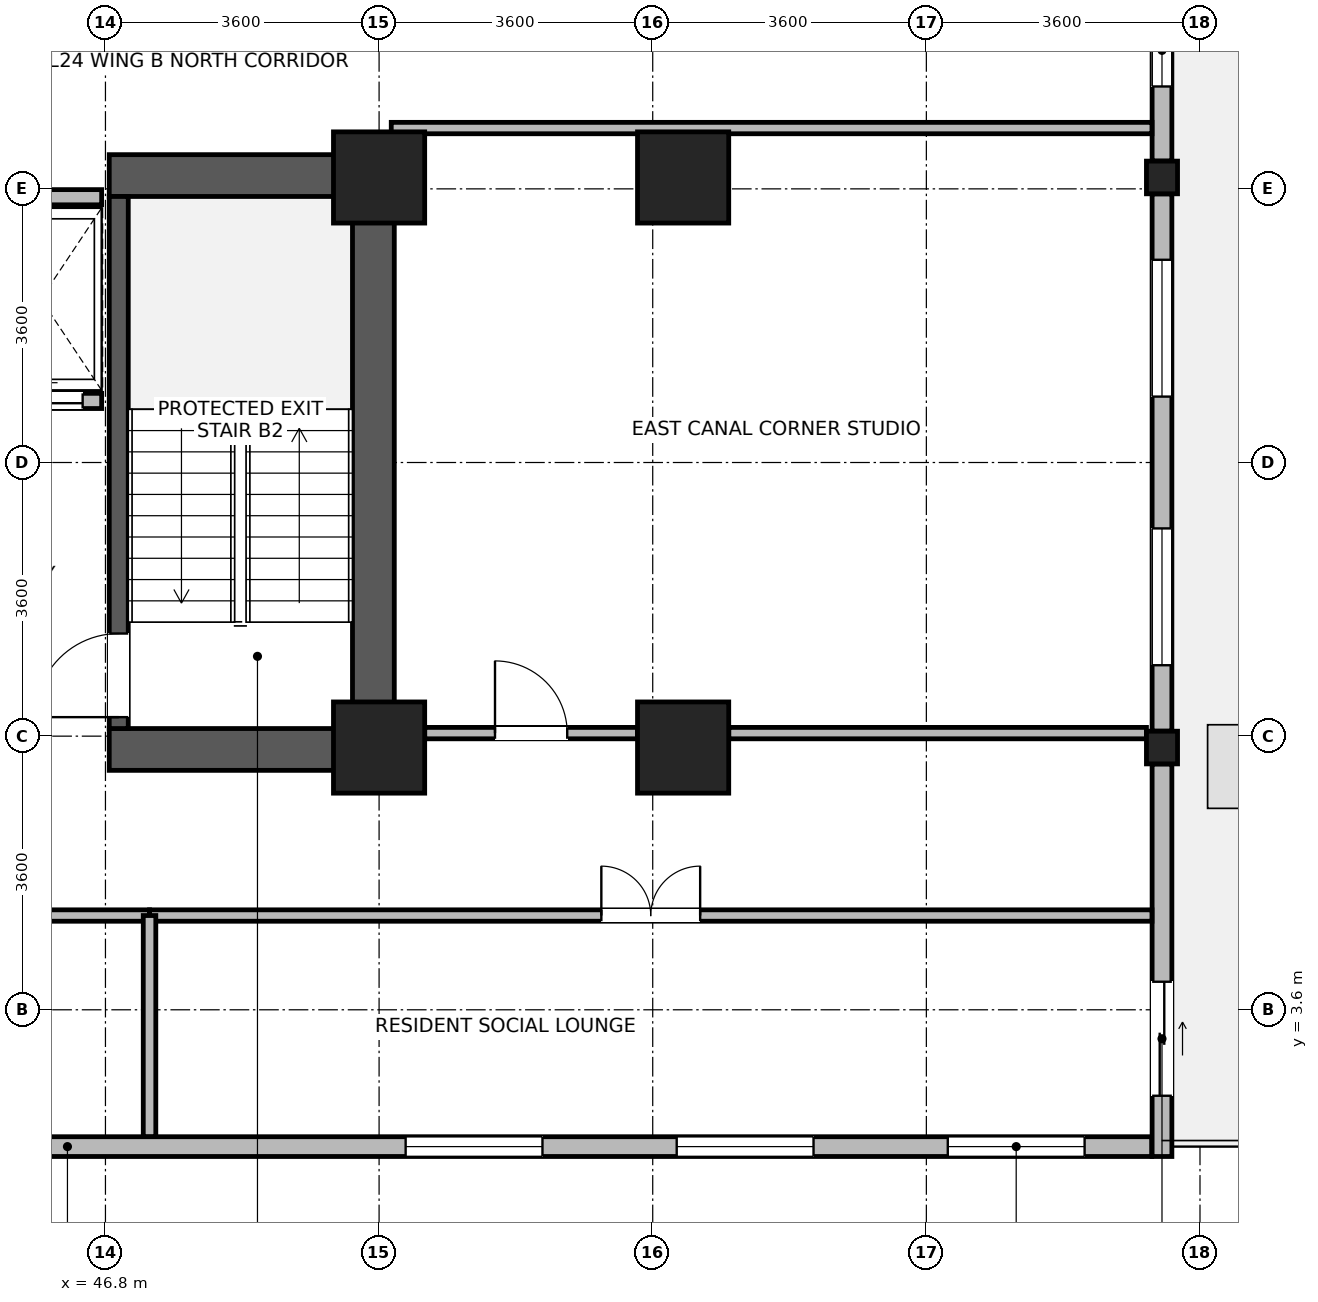
"""IFC4 building model, lengths in metres.
Left out: names, types, materials, properties, quantities, classifications, styles, units other than length and angle.
Written with IfcOpenShell. Run it as: python <this file> out.ifc"""

import sys

from ifc_helpers import new_model, si_unit, direction, frame, frame_2d, origin, origin_2d, place, context, subcontext, project, spatial, rectangle, i_section, extrude, source, transform, mapped, element, fill, save


model = new_model("IFC4")
c1 = context("Model", 3, precision=1e-05, world=origin(), true_north=direction((0.0, 1.0)))
c2 = subcontext(c1, "Body", "Model", "MODEL_VIEW")
j1 = project(units=[si_unit("LENGTHUNIT", "METRE"), si_unit("PLANEANGLEUNIT", "RADIAN")], contexts=[c1])
p1 = place(None, origin())
s1 = spatial("IfcSite", under=j1, at=p1, CompositionType="ELEMENT")
p2 = place(p1, origin())
s2 = spatial("IfcBuilding", under=s1, at=p2, CompositionType="ELEMENT")
p3 = place(p2, frame((0.0, 0.0, 97.1)))
s3 = spatial("IfcBuildingStorey", under=s2, at=p3, CompositionType="ELEMENT", Elevation=97.1)
p4 = place(p3, frame((50.325, 6.75, 0.0), z_axis=(0.0, 0.0, 1.0), x_axis=(0.0, 1.0, 0.0)))
e1 = element("IfcWall", 1, at=p4, inside=s3, PredefinedType="SHEAR", context=c2, shape_type="SweptSolid", body=[
    extrude(rectangle(XDim=8.1, YDim=0.55, at=frame_2d((4.05, 0.0))), origin(), (0.0, 0.0, 1.0), 3.45),
])
for number, where, z_axis, x_axis in (
    (2, (46.85, 7.025, 0.0), (0.0, 0.0, 1.0), (1.0, 0.0, 0.0)),
    (3, (46.85, 14.575, 0.0), (0.0, 0.0, 1.0), (1.0, 0.0, 0.0)),
):
    element("IfcWall", number, at=place(p3, frame(where, z_axis=z_axis, x_axis=x_axis)), inside=s3, PredefinedType="SHEAR", context=c2, shape_type="SweptSolid", body=[
        extrude(rectangle(XDim=3.2, YDim=0.55, at=frame_2d((1.6, 0.0))), origin(), (0.0, 0.0, 1.0), 3.45),
    ])
p5 = place(p3, frame((46.975, 7.3, 0.0), z_axis=(0.0, 0.0, 1.0), x_axis=(0.0, 1.0, 0.0)))
e4 = element("IfcWall", 4, at=p5, inside=s3, PredefinedType="SHEAR", context=c2, shape_type="SweptSolid", body=[
    extrude(rectangle(XDim=7.0, YDim=0.25, at=frame_2d((3.5, 0.0))), origin(), (0.0, 0.0, 1.0), 3.45),
])
p6 = place(p5, frame((0.15, 0.0, 0.0)))
e5 = element("IfcOpeningElement", 5, at=p6, cuts=e4, PredefinedType="OPENING", context=c2, shape_type="SweptSolid", body=[
    extrude(rectangle(XDim=1.1, YDim=2.08, at=frame_2d((0.55, 1.04))), frame((0.0, 0.135, 0.0), z_axis=(0.0, -1.0, 0.0), x_axis=(1.0, 0.0, 0.0)), (0.0, 0.0, 1.0), 0.27),
])
m1 = source(origin(), c2, "Body", "SweptSolid", [
    extrude(rectangle(XDim=1.2, YDim=1.2, at=origin_2d()), origin(), (0.0, 0.0, 1.0), 3.7),
])
for number, where, z_axis, x_axis in (
    (6, (50.4, 7.05, 0.0), (0.0, 0.0, 1.0), (1.0, 0.0, 0.0)),
    (7, (50.4, 14.55, 0.0), (0.0, 0.0, 1.0), (1.0, 0.0, 0.0)),
    (8, (54.4, 7.05, 0.0), (0.0, 0.0, 1.0), (1.0, 0.0, 0.0)),
    (9, (54.4, 14.55, 0.0), (0.0, 0.0, 1.0), (1.0, 0.0, 0.0)),
):
    element("IfcColumn", number, at=place(p3, frame(where, z_axis=z_axis, x_axis=x_axis)), inside=s3, PredefinedType="COLUMN", context=c2, shape_type="MappedRepresentation", body=[
        mapped(m1, transform((0.0, 0.0, 0.0), x_axis=(1.0, 0.0, 0.0), y_axis=(0.0, 1.0, 0.0), z_axis=(0.0, 0.0, 1.0), scale=1.0)),
    ])
m2 = source(origin(), c2, "Body", "SweptSolid", [
    extrude(i_section(OverallWidth=0.409, OverallDepth=0.43, WebThickness=0.024, FlangeThickness=0.033, FilletRadius=0.015, at=origin_2d()), origin(), (0.0, 0.0, 1.0), 3.7),
])
for number, where, z_axis, x_axis in (
    (10, (60.7, 7.05, 0.0), (0.0, 0.0, 1.0), (1.0, 0.0, 0.0)),
    (11, (60.7, 14.55, 0.0), (0.0, 0.0, 1.0), (1.0, 0.0, 0.0)),
):
    element("IfcColumn", number, at=place(p3, frame(where, z_axis=z_axis, x_axis=x_axis)), inside=s3, PredefinedType="COLUMN", context=c2, shape_type="MappedRepresentation", body=[
        mapped(m2, transform((0.0, 0.0, 0.0), x_axis=(1.0, 0.0, 0.0), y_axis=(0.0, 1.0, 0.0), z_axis=(0.0, 0.0, 1.0), scale=1.0)),
    ])
p7 = place(p3, frame((60.565, 1.8, 0.0), z_axis=(0.0, 0.0, 1.0), x_axis=(-1.0, 0.0, 0.0)))
e12 = element("IfcWall", 12, at=p7, inside=s3, PredefinedType="STANDARD", context=c2, shape_type="SweptSolid", body=[
    extrude(rectangle(XDim=28.53, YDim=0.26, at=frame_2d((14.265, 0.0))), origin(), (0.0, 0.0, 1.0), 3.43),
])
p8 = place(p7, frame((0.883, 0.0, 0.85)))
e13 = element("IfcOpeningElement", 13, at=p8, cuts=e12, PredefinedType="OPENING", context=c2, shape_type="SweptSolid", body=[
    extrude(rectangle(XDim=1.8, YDim=1.85, at=frame_2d((0.9, 0.925))), frame((0.0, 0.14, 0.0), z_axis=(0.0, -1.0, 0.0), x_axis=(1.0, 0.0, 0.0)), (0.0, 0.0, 1.0), 0.28),
])
p9 = place(p7, frame((4.449, 0.0, 0.85)))
e14 = element("IfcOpeningElement", 14, at=p9, cuts=e12, PredefinedType="OPENING", context=c2, shape_type="SweptSolid", body=[
    extrude(rectangle(XDim=1.8, YDim=1.85, at=frame_2d((0.9, 0.925))), frame((0.0, 0.14, 0.0), z_axis=(0.0, -1.0, 0.0), x_axis=(1.0, 0.0, 0.0)), (0.0, 0.0, 1.0), 0.28),
])
p10 = place(p7, frame((8.016, 0.0, 0.85)))
e15 = element("IfcOpeningElement", 15, at=p10, cuts=e12, PredefinedType="OPENING", context=c2, shape_type="SweptSolid", body=[
    extrude(rectangle(XDim=1.8, YDim=1.85, at=frame_2d((0.9, 0.925))), frame((0.0, 0.14, 0.0), z_axis=(0.0, -1.0, 0.0), x_axis=(1.0, 0.0, 0.0)), (0.0, 0.0, 1.0), 0.28),
])
p11 = place(p7, frame((15.148, 0.0, 0.85)))
e16 = element("IfcOpeningElement", 16, at=p11, cuts=e12, PredefinedType="OPENING", context=c2, shape_type="SweptSolid", body=[
    extrude(rectangle(XDim=1.8, YDim=1.85, at=frame_2d((0.9, 0.925))), frame((0.0, 0.14, 0.0), z_axis=(0.0, -1.0, 0.0), x_axis=(1.0, 0.0, 0.0)), (0.0, 0.0, 1.0), 0.28),
])
p12 = place(p7, frame((18.714, 0.0, 0.85)))
e17 = element("IfcOpeningElement", 17, at=p12, cuts=e12, PredefinedType="OPENING", context=c2, shape_type="SweptSolid", body=[
    extrude(rectangle(XDim=1.8, YDim=1.85, at=frame_2d((0.9, 0.925))), frame((0.0, 0.14, 0.0), z_axis=(0.0, -1.0, 0.0), x_axis=(1.0, 0.0, 0.0)), (0.0, 0.0, 1.0), 0.28),
])
p13 = place(p7, frame((22.281, 0.0, 0.85)))
e18 = element("IfcOpeningElement", 18, at=p13, cuts=e12, PredefinedType="OPENING", context=c2, shape_type="SweptSolid", body=[
    extrude(rectangle(XDim=1.8, YDim=1.85, at=frame_2d((0.9, 0.925))), frame((0.0, 0.14, 0.0), z_axis=(0.0, -1.0, 0.0), x_axis=(1.0, 0.0, 0.0)), (0.0, 0.0, 1.0), 0.28),
])
p14 = place(p7, frame((25.847, 0.0, 0.85)))
e19 = element("IfcOpeningElement", 19, at=p14, cuts=e12, PredefinedType="OPENING", context=c2, shape_type="SweptSolid", body=[
    extrude(rectangle(XDim=1.8, YDim=1.85, at=frame_2d((0.9, 0.925))), frame((0.0, 0.14, 0.0), z_axis=(0.0, -1.0, 0.0), x_axis=(1.0, 0.0, 0.0)), (0.0, 0.0, 1.0), 0.28),
])
p15 = place(p3, frame((60.7, 6.834, 0.0), z_axis=(0.0, 0.0, 1.0), x_axis=(0.0, -1.0, 0.0)))
e20 = element("IfcWall", 20, at=p15, inside=s3, PredefinedType="STANDARD", context=c2, shape_type="SweptSolid", body=[
    extrude(rectangle(XDim=5.164, YDim=0.26, at=frame_2d((2.582, 0.0))), origin(), (0.0, 0.0, 1.0), 3.43),
])
p16 = place(p15, frame((2.865, 0.0, 0.0)))
e21 = element("IfcOpeningElement", 21, at=p16, cuts=e20, PredefinedType="OPENING", context=c2, shape_type="SweptSolid", body=[
    extrude(rectangle(XDim=1.5, YDim=2.15, at=frame_2d((0.75, 1.075))), frame((0.0, 0.14, 0.0), z_axis=(0.0, -1.0, 0.0), x_axis=(1.0, 0.0, 0.0)), (0.0, 0.0, 1.0), 0.28),
])
p17 = place(p3, frame((60.7, 14.334, 0.0), z_axis=(0.0, 0.0, 1.0), x_axis=(0.0, -1.0, 0.0)))
e22 = element("IfcWall", 22, at=p17, inside=s3, PredefinedType="STANDARD", context=c2, shape_type="SweptSolid", body=[
    extrude(rectangle(XDim=7.068, YDim=0.26, at=frame_2d((3.534, 0.0))), origin(), (0.0, 0.0, 1.0), 2.98),
])
p18 = place(p17, frame((0.867, 0.0, 0.85)))
e23 = element("IfcOpeningElement", 23, at=p18, cuts=e22, PredefinedType="OPENING", context=c2, shape_type="SweptSolid", body=[
    extrude(rectangle(XDim=1.8, YDim=1.85, at=frame_2d((0.9, 0.925))), frame((0.0, 0.14, 0.0), z_axis=(0.0, -1.0, 0.0), x_axis=(1.0, 0.0, 0.0)), (0.0, 0.0, 1.0), 0.28),
])
p19 = place(p17, frame((4.401, 0.0, 0.85)))
e24 = element("IfcOpeningElement", 24, at=p19, cuts=e22, PredefinedType="OPENING", context=c2, shape_type="SweptSolid", body=[
    extrude(rectangle(XDim=1.8, YDim=1.85, at=frame_2d((0.9, 0.925))), frame((0.0, 0.14, 0.0), z_axis=(0.0, -1.0, 0.0), x_axis=(1.0, 0.0, 0.0)), (0.0, 0.0, 1.0), 0.28),
])
p20 = place(p3, frame((60.7, 21.384, 0.0), z_axis=(0.0, 0.0, 1.0), x_axis=(0.0, -1.0, 0.0)))
e25 = element("IfcWall", 25, at=p20, inside=s3, PredefinedType="STANDARD", context=c2, shape_type="SweptSolid", body=[
    extrude(rectangle(XDim=6.618, YDim=0.26, at=frame_2d((3.309, 0.0))), origin(), (0.0, 0.0, 1.0), 2.98),
])
p21 = place(p20, frame((0.754, 0.0, 0.85)))
e26 = element("IfcOpeningElement", 26, at=p21, cuts=e25, PredefinedType="OPENING", context=c2, shape_type="SweptSolid", body=[
    extrude(rectangle(XDim=1.8, YDim=1.85, at=frame_2d((0.9, 0.925))), frame((0.0, 0.14, 0.0), z_axis=(0.0, -1.0, 0.0), x_axis=(1.0, 0.0, 0.0)), (0.0, 0.0, 1.0), 0.28),
])
p22 = place(p20, frame((4.687, 0.0, 0.85)))
e27 = element("IfcOpeningElement", 27, at=p22, cuts=e25, PredefinedType="OPENING", context=c2, shape_type="SweptSolid", body=[
    extrude(rectangle(XDim=0.95, YDim=1.75, at=frame_2d((0.475, 0.875))), frame((0.0, 0.14, 0.0), z_axis=(0.0, -1.0, 0.0), x_axis=(1.0, 0.0, 0.0)), (0.0, 0.0, 1.0), 0.28),
])
p23 = place(p3, frame((45.15, 11.61, 0.0), z_axis=(0.0, 0.0, 1.0), x_axis=(1.0, 0.0, 0.0)))
e28 = element("IfcWall", 28, at=p23, inside=s3, PredefinedType="PARTITIONING", context=c2, shape_type="SweptSolid", body=[
    extrude(rectangle(XDim=1.6, YDim=0.2, at=frame_2d((0.8, 0.0))), origin(), (0.0, 0.0, 1.0), 3.43),
])
p24 = place(p23, frame((0.25, 0.0, 0.0)))
e29 = element("IfcOpeningElement", 29, at=p24, cuts=e28, PredefinedType="OPENING", context=c2, shape_type="SweptSolid", body=[
    extrude(rectangle(XDim=1.1, YDim=2.12, at=frame_2d((0.55, 1.06))), frame((0.0, 0.11, 0.0), z_axis=(0.0, -1.0, 0.0), x_axis=(1.0, 0.0, 0.0)), (0.0, 0.0, 1.0), 0.22),
])
p25 = place(p3, frame((45.15, 14.29, 0.0), z_axis=(0.0, 0.0, 1.0), x_axis=(1.0, 0.0, 0.0)))
e30 = element("IfcWall", 30, at=p25, inside=s3, PredefinedType="PARTITIONING", context=c2, shape_type="SweptSolid", body=[
    extrude(rectangle(XDim=1.6, YDim=0.2, at=frame_2d((0.8, 0.0))), origin(), (0.0, 0.0, 1.0), 2.43),
])
p26 = place(p3, frame((47.38, 4.84, 0.0), z_axis=(0.0, 0.0, 1.0), x_axis=(1.0, 0.0, 0.0)))
e31 = element("IfcWall", 31, at=p26, inside=s3, PredefinedType="PARTITIONING", context=c2, shape_type="SweptSolid", body=[
    extrude(rectangle(XDim=13.188, YDim=0.15, at=frame_2d((6.594, 0.0))), origin(), (0.0, 0.0, 1.0), 3.43),
])
p27 = place(p26, frame((5.944, 0.0, 0.0)))
e32 = element("IfcOpeningElement", 32, at=p27, cuts=e31, PredefinedType="OPENING", context=c2, shape_type="SweptSolid", body=[
    extrude(rectangle(XDim=1.3, YDim=2.12, at=frame_2d((0.65, 1.06))), frame((0.0, 0.085, 0.0), z_axis=(0.0, -1.0, 0.0), x_axis=(1.0, 0.0, 0.0)), (0.0, 0.0, 1.0), 0.17),
])
p28 = place(p3, frame((51.0, 7.24, 0.0), z_axis=(0.0, 0.0, 1.0), x_axis=(1.0, 0.0, 0.0)))
e33 = element("IfcWall", 33, at=p28, inside=s3, PredefinedType="PARTITIONING", context=c2, shape_type="SweptSolid", body=[
    extrude(rectangle(XDim=2.8, YDim=0.15, at=frame_2d((1.4, 0.0))), origin(), (0.0, 0.0, 1.0), 2.78),
])
p29 = place(p28, frame((0.925, 0.0, 0.0)))
e34 = element("IfcOpeningElement", 34, at=p29, cuts=e33, PredefinedType="OPENING", context=c2, shape_type="SweptSolid", body=[
    extrude(rectangle(XDim=0.95, YDim=2.1, at=frame_2d((0.475, 1.05))), frame((0.0, 0.085, 0.0), z_axis=(0.0, -1.0, 0.0), x_axis=(1.0, 0.0, 0.0)), (0.0, 0.0, 1.0), 0.17),
])
p30 = place(p3, frame((55.0, 7.24, 0.0), z_axis=(0.0, 0.0, 1.0), x_axis=(1.0, 0.0, 0.0)))
e35 = element("IfcWall", 35, at=p30, inside=s3, PredefinedType="PARTITIONING", context=c2, shape_type="SweptSolid", body=[
    extrude(rectangle(XDim=5.496, YDim=0.15, at=frame_2d((2.748, 0.0))), origin(), (0.0, 0.0, 1.0), 2.78),
])
p31 = place(p3, frame((50.56, 15.2, 0.0), z_axis=(0.0, 0.0, 1.0), x_axis=(1.0, 0.0, 0.0)))
e36 = element("IfcWall", 36, at=p31, inside=s3, PredefinedType="PARTITIONING", context=c2, shape_type="SweptSolid", body=[
    extrude(rectangle(XDim=10.008, YDim=0.15, at=frame_2d((5.004, 0.0))), origin(), (0.0, 0.0, 1.0), 3.43),
])
p32 = place(p3, frame((39.44, 4.84, 0.0), z_axis=(0.0, 0.0, 1.0), x_axis=(1.0, 0.0, 0.0)))
e37 = element("IfcWall", 37, at=p32, inside=s3, PredefinedType="PARTITIONING", context=c2, shape_type="SweptSolid", body=[
    extrude(rectangle(XDim=7.94, YDim=0.15, at=frame_2d((3.97, 0.0))), origin(), (0.0, 0.0, 1.0), 3.43),
])
p33 = place(p32, frame((3.495, 0.0, 0.0)))
e38 = element("IfcOpeningElement", 38, at=p33, cuts=e37, PredefinedType="OPENING", context=c2, shape_type="SweptSolid", body=[
    extrude(rectangle(XDim=0.95, YDim=2.1, at=frame_2d((0.475, 1.05))), frame((0.0, 0.085, 0.0), z_axis=(0.0, -1.0, 0.0), x_axis=(1.0, 0.0, 0.0)), (0.0, 0.0, 1.0), 0.17),
])
p34 = place(p3, frame((47.38, 1.932, 0.0), z_axis=(0.0, 0.0, 1.0), x_axis=(0.0, 1.0, 0.0)))
e39 = element("IfcWall", 39, at=p34, inside=s3, PredefinedType="PARTITIONING", context=c2, shape_type="SweptSolid", body=[
    extrude(rectangle(XDim=2.908, YDim=0.165, at=frame_2d((1.454, 0.0))), origin(), (0.0, 0.0, 1.0), 3.43),
])
p35 = place(p8, origin())
e40 = element("IfcWindow", 40, at=p35, inside=s3, PartitioningType="SINGLE_PANEL", PredefinedType="WINDOW", context=c2, shape_type="SweptSolid", body=[
    extrude(rectangle(XDim=1.8, YDim=1.85, at=frame_2d((0.9, 0.925))), frame((0.0, 0.03, 0.0), z_axis=(0.0, -1.0, 0.0), x_axis=(1.0, 0.0, 0.0)), (0.0, 0.0, 1.0), 0.06),
])
fill(e13, e40)
p36 = place(p9, origin())
e41 = element("IfcWindow", 41, at=p36, inside=s3, PartitioningType="SINGLE_PANEL", PredefinedType="WINDOW", context=c2, shape_type="SweptSolid", body=[
    extrude(rectangle(XDim=1.8, YDim=1.85, at=frame_2d((0.9, 0.925))), frame((0.0, 0.03, 0.0), z_axis=(0.0, -1.0, 0.0), x_axis=(1.0, 0.0, 0.0)), (0.0, 0.0, 1.0), 0.06),
])
fill(e14, e41)
p37 = place(p10, origin())
e42 = element("IfcWindow", 42, at=p37, inside=s3, PartitioningType="SINGLE_PANEL", PredefinedType="WINDOW", context=c2, shape_type="SweptSolid", body=[
    extrude(rectangle(XDim=1.8, YDim=1.85, at=frame_2d((0.9, 0.925))), frame((0.0, 0.03, 0.0), z_axis=(0.0, -1.0, 0.0), x_axis=(1.0, 0.0, 0.0)), (0.0, 0.0, 1.0), 0.06),
])
fill(e15, e42)
p38 = place(p16, origin())
e43 = element("IfcDoor", 43, at=p38, inside=s3, OperationType="SLIDING_TO_LEFT", PredefinedType="DOOR", context=c2, shape_type="SweptSolid", body=[
    extrude(rectangle(XDim=1.5, YDim=2.15, at=frame_2d((0.75, 1.075))), frame((0.0, 0.025, 0.0), z_axis=(0.0, -1.0, 0.0), x_axis=(1.0, 0.0, 0.0)), (0.0, 0.0, 1.0), 0.05),
])
fill(e21, e43)
p39 = place(p18, origin())
e44 = element("IfcWindow", 44, at=p39, inside=s3, PartitioningType="SINGLE_PANEL", PredefinedType="WINDOW", context=c2, shape_type="SweptSolid", body=[
    extrude(rectangle(XDim=1.8, YDim=1.85, at=frame_2d((0.9, 0.925))), frame((0.0, 0.03, 0.0), z_axis=(0.0, -1.0, 0.0), x_axis=(1.0, 0.0, 0.0)), (0.0, 0.0, 1.0), 0.06),
])
fill(e23, e44)
p40 = place(p19, origin())
e45 = element("IfcWindow", 45, at=p40, inside=s3, PartitioningType="SINGLE_PANEL", PredefinedType="WINDOW", context=c2, shape_type="SweptSolid", body=[
    extrude(rectangle(XDim=1.8, YDim=1.85, at=frame_2d((0.9, 0.925))), frame((0.0, 0.03, 0.0), z_axis=(0.0, -1.0, 0.0), x_axis=(1.0, 0.0, 0.0)), (0.0, 0.0, 1.0), 0.06),
])
fill(e24, e45)
p41 = place(p22, origin())
e46 = element("IfcWindow", 46, at=p41, inside=s3, PartitioningType="SINGLE_PANEL", PredefinedType="WINDOW", context=c2, shape_type="SweptSolid", body=[
    extrude(rectangle(XDim=0.95, YDim=1.75, at=frame_2d((0.475, 0.875))), frame((0.0, 0.03, 0.0), z_axis=(0.0, -1.0, 0.0), x_axis=(1.0, 0.0, 0.0)), (0.0, 0.0, 1.0), 0.06),
])
fill(e27, e46)
p42 = place(p6, origin())
e47 = element("IfcDoor", 47, at=p42, inside=s3, OperationType="SINGLE_SWING_LEFT", PredefinedType="DOOR", context=c2, shape_type="SweptSolid", body=[
    extrude(rectangle(XDim=1.1, YDim=2.08, at=frame_2d((0.55, 1.04))), frame((0.0, 0.025, 0.0), z_axis=(0.0, -1.0, 0.0), x_axis=(1.0, 0.0, 0.0)), (0.0, 0.0, 1.0), 0.05),
])
fill(e5, e47)
p43 = place(p24, origin())
e48 = element("IfcDoor", 48, at=p43, inside=s3, OperationType="SLIDING_TO_LEFT", PredefinedType="DOOR", context=c2, shape_type="SweptSolid", body=[
    extrude(rectangle(XDim=1.1, YDim=2.12, at=frame_2d((0.55, 1.06))), frame((0.0, 0.025, 0.0), z_axis=(0.0, -1.0, 0.0), x_axis=(1.0, 0.0, 0.0)), (0.0, 0.0, 1.0), 0.05),
])
fill(e29, e48)
p44 = place(p27, origin())
e49 = element("IfcDoor", 49, at=p44, inside=s3, OperationType="DOUBLE_DOOR_SINGLE_SWING", PredefinedType="DOOR", context=c2, shape_type="SweptSolid", body=[
    extrude(rectangle(XDim=1.3, YDim=2.12, at=frame_2d((0.65, 1.06))), frame((0.0, 0.025, 0.0), z_axis=(0.0, -1.0, 0.0), x_axis=(1.0, 0.0, 0.0)), (0.0, 0.0, 1.0), 0.05),
])
fill(e32, e49)
p45 = place(p29, origin())
e50 = element("IfcDoor", 50, at=p45, inside=s3, OperationType="SINGLE_SWING_LEFT", PredefinedType="DOOR", context=c2, shape_type="SweptSolid", body=[
    extrude(rectangle(XDim=0.95, YDim=2.1, at=frame_2d((0.475, 1.05))), frame((0.0, 0.025, 0.0), z_axis=(0.0, -1.0, 0.0), x_axis=(1.0, 0.0, 0.0)), (0.0, 0.0, 1.0), 0.05),
])
fill(e34, e50)
save(model, sys.argv[1])
